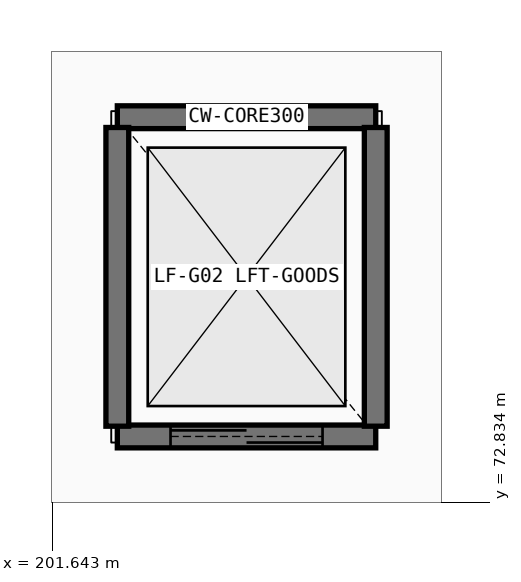
"""IFC4 building model, lengths in metres.
Left out: names, types, materials, properties, quantities, classifications, styles, units other than length and angle.
Written with IfcOpenShell. Run it as: python <this file> out.ifc"""

import sys

from ifc_helpers import new_model, si_unit, direction, frame, frame_2d, origin, place, context, subcontext, project, spatial, rectangle, extrude, element, fill, save


model = new_model("IFC4")
c1 = context("Model", 3, precision=1e-05, world=origin(), true_north=direction((0.0, 1.0)))
c2 = subcontext(c1, "Body", "Model", "MODEL_VIEW")
j1 = project(units=[si_unit("LENGTHUNIT", "METRE"), si_unit("PLANEANGLEUNIT", "RADIAN")], contexts=[c1])
p1 = place(None, origin())
s1 = spatial("IfcSite", under=j1, at=p1, CompositionType="ELEMENT")
p2 = place(p1, origin())
s2 = spatial("IfcBuilding", under=s1, at=p2, CompositionType="ELEMENT")
p3 = place(p2, frame((0.0, 0.0, 6.0)))
s3 = spatial("IfcBuildingStorey", under=s2, at=p3, CompositionType="ELEMENT", Elevation=6.0)
p4 = place(p3, frame((205.9, 77.9, 0.0), z_axis=(0.0, 0.0, 1.0), x_axis=(-1.0, 0.0, 0.0)))
e1 = element("IfcWall", 1, at=p4, inside=s3, PredefinedType="SHEAR", context=c2, shape_type="SweptSolid", body=[
    extrude(rectangle(XDim=3.4, YDim=0.3, at=frame_2d((1.7, 0.0))), origin(), (0.0, 0.0, 1.0), 5.17),
])
p5 = place(p3, frame((202.5, 73.7, 0.0), z_axis=(0.0, 0.0, 1.0), x_axis=(1.0, 0.0, 0.0)))
e2 = element("IfcWall", 2, at=p5, inside=s3, PredefinedType="SHEAR", context=c2, shape_type="SweptSolid", body=[
    extrude(rectangle(XDim=3.4, YDim=0.3, at=frame_2d((1.7, 0.0))), origin(), (0.0, 0.0, 1.0), 5.17),
])
p6 = place(p5, frame((0.7, 0.0, 0.0)))
e3 = element("IfcOpeningElement", 3, at=p6, cuts=e2, PredefinedType="OPENING", context=c2, shape_type="SweptSolid", body=[
    extrude(rectangle(XDim=2.0, YDim=2.5, at=frame_2d((1.0, 1.25))), frame((0.0, 0.16, 0.0), z_axis=(0.0, -1.0, 0.0), x_axis=(1.0, 0.0, 0.0)), (0.0, 0.0, 1.0), 0.32),
])
for number, where, z_axis, x_axis in (
    (4, (205.9, 73.835, 0.0), (0.0, 0.0, 1.0), (0.0, 1.0, 0.0)),
    (5, (202.5, 77.765, 0.0), (0.0, 0.0, 1.0), (0.0, -1.0, 0.0)),
):
    element("IfcWall", number, at=place(p3, frame(where, z_axis=z_axis, x_axis=x_axis)), inside=s3, PredefinedType="SHEAR", context=c2, shape_type="SweptSolid", body=[
        extrude(rectangle(XDim=3.93, YDim=0.3, at=frame_2d((1.965, 0.0))), origin(), (0.0, 0.0, 1.0), 5.17),
    ])
p7 = place(p6, origin())
e6 = element("IfcDoor", 6, at=p7, inside=s3, OperationType="DOUBLE_DOOR_SLIDING", PredefinedType="DOOR", context=c2, shape_type="SweptSolid", body=[
    extrude(rectangle(XDim=2.0, YDim=2.5, at=frame_2d((1.0, 1.25))), frame((0.0, 0.025, 0.0), z_axis=(0.0, -1.0, 0.0), x_axis=(1.0, 0.0, 0.0)), (0.0, 0.0, 1.0), 0.05),
])
fill(e3, e6)
save(model, sys.argv[1])
